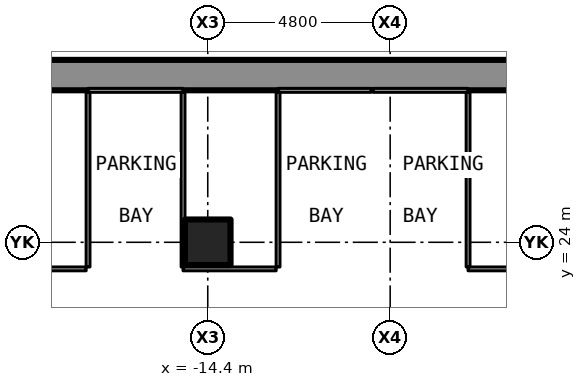
"""IFC4 building model, lengths in metres.
Left out: names, types, materials, properties, quantities, classifications, styles, units other than length and angle.
Written with IfcOpenShell. Run it as: python <this file> out.ifc"""

import sys

from ifc_helpers import new_model, si_unit, direction, frame, frame_2d, origin, origin_2d, place, context, subcontext, project, spatial, rectangle, hollow_rectangle, extrude, element, save


model = new_model("IFC4")
c1 = context("Model", 3, precision=1e-05, world=origin(), true_north=direction((0.0, 1.0)))
c2 = subcontext(c1, "Body", "Model", "MODEL_VIEW")
j1 = project(units=[si_unit("LENGTHUNIT", "METRE"), si_unit("PLANEANGLEUNIT", "RADIAN")], contexts=[c1])
p1 = place(None, origin())
s1 = spatial("IfcSite", under=j1, at=p1, CompositionType="ELEMENT")
p2 = place(p1, origin())
s2 = spatial("IfcBuilding", under=s1, at=p2, CompositionType="ELEMENT")
p3 = place(p2, frame((0.0, 0.0, -5.0)))
s3 = spatial("IfcBuildingStorey", under=s2, at=p3, CompositionType="ELEMENT", Elevation=-5.0)
p4 = place(p3, frame((-14.4, 24.0, -0.3), z_axis=(0.0, 0.0, 1.0), x_axis=(1.0, 0.0, 0.0)))
e1 = element("IfcColumn", 1, at=p4, inside=s3, PredefinedType="COLUMN", context=c2, shape_type="SweptSolid", body=[
    extrude(hollow_rectangle(XDim=1.2, YDim=1.2, WallThickness=0.07, at=origin_2d()), origin(), (0.0, 0.0, 1.0), 5.0),
])
p5 = place(p3, frame((-37.6, 28.4, -0.3), z_axis=(0.0, 0.0, 1.0), x_axis=(1.0, 0.0, 0.0)))
e2 = element("IfcWall", 2, at=p5, inside=s3, PredefinedType="SOLIDWALL", context=c2, shape_type="SweptSolid", body=[
    extrude(rectangle(XDim=75.2, YDim=0.8, at=frame_2d((37.6, 0.0))), origin(), (0.0, 0.0, 1.0), 4.378),
])
p6 = place(p3, frame((-22.55, 23.3, 0.0), z_axis=(0.0, 0.0, 1.0), x_axis=(1.0, 0.0, 0.0)))
e3 = element("IfcWall", 3, at=p6, inside=s3, PredefinedType="PARTITIONING", context=c2, shape_type="SweptSolid", body=[
    extrude(rectangle(XDim=4.95, YDim=0.1, at=frame_2d((2.475, 0.0))), origin(), (0.0, 0.0, 1.0), 4.7),
])
p7 = place(p3, frame((-15.05, 23.3, 0.0), z_axis=(0.0, 0.0, 1.0), x_axis=(1.0, 0.0, 0.0)))
e4 = element("IfcWall", 4, at=p7, inside=s3, PredefinedType="PARTITIONING", context=c2, shape_type="SweptSolid", body=[
    extrude(rectangle(XDim=2.45, YDim=0.1, at=frame_2d((1.225, 0.0))), origin(), (0.0, 0.0, 1.0), 4.7),
])
p8 = place(p3, frame((-7.55, 23.3, 0.0), z_axis=(0.0, 0.0, 1.0), x_axis=(1.0, 0.0, 0.0)))
e5 = element("IfcWall", 5, at=p8, inside=s3, PredefinedType="PARTITIONING", context=c2, shape_type="SweptSolid", body=[
    extrude(rectangle(XDim=45.15, YDim=0.1, at=frame_2d((22.575, 0.0))), origin(), (0.0, 0.0, 1.0), 4.7),
])
p9 = place(p3, frame((-17.55, 28.0, 0.0), z_axis=(0.0, 0.0, 1.0), x_axis=(1.0, 0.0, 0.0)))
e6 = element("IfcWall", 6, at=p9, inside=s3, PredefinedType="PARTITIONING", context=c2, shape_type="SweptSolid", body=[
    extrude(rectangle(XDim=2.5, YDim=0.1, at=frame_2d((1.25, 0.0))), origin(), (0.0, 0.0, 1.0), 4.7),
])
p10 = place(p3, frame((-12.55, 28.0, 0.0), z_axis=(0.0, 0.0, 1.0), x_axis=(1.0, 0.0, 0.0)))
e7 = element("IfcWall", 7, at=p10, inside=s3, PredefinedType="PARTITIONING", context=c2, shape_type="SweptSolid", body=[
    extrude(rectangle(XDim=2.45, YDim=0.1, at=frame_2d((1.225, 0.0))), origin(), (0.0, 0.0, 1.0), 4.7),
])
p11 = place(p3, frame((-10.05, 28.0, 0.0), z_axis=(0.0, 0.0, 1.0), x_axis=(1.0, 0.0, 0.0)))
e8 = element("IfcWall", 8, at=p11, inside=s3, PredefinedType="PARTITIONING", context=c2, shape_type="SweptSolid", body=[
    extrude(rectangle(XDim=2.5, YDim=0.1, at=frame_2d((1.25, 0.0))), origin(), (0.0, 0.0, 1.0), 4.7),
])
for number, where, z_axis, x_axis in (
    (9, (-17.55, 23.35, 0.0), (0.0, 0.0, 1.0), (0.0, 1.0, 0.0)),
    (10, (-15.05, 23.35, 0.0), (0.0, 0.0, 1.0), (0.0, 1.0, 0.0)),
    (11, (-12.55, 23.35, 0.0), (0.0, 0.0, 1.0), (0.0, 1.0, 0.0)),
    (12, (-7.55, 23.35, 0.0), (0.0, 0.0, 1.0), (0.0, 1.0, 0.0)),
):
    element("IfcWall", number, at=place(p3, frame(where, z_axis=z_axis, x_axis=x_axis)), inside=s3, PredefinedType="PARTITIONING", context=c2, shape_type="SweptSolid", body=[
        extrude(rectangle(XDim=4.6, YDim=0.1, at=frame_2d((2.3, 0.0))), origin(), (0.0, 0.0, 1.0), 4.7),
    ])
save(model, sys.argv[1])
